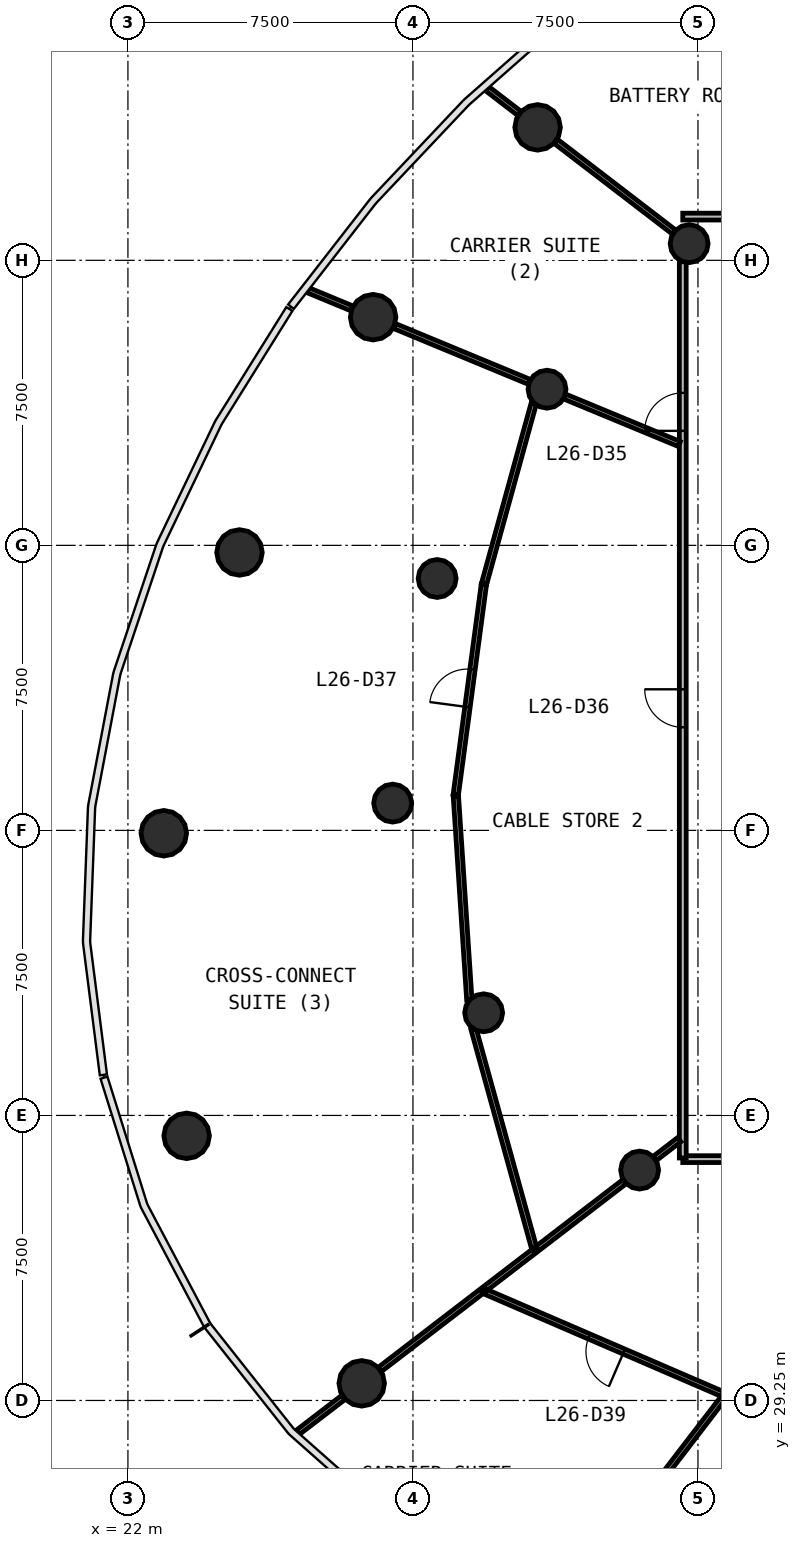
"""IFC4 building model, lengths in metres.
Left out: names, types, materials, properties, quantities, classifications, styles, units other than length and angle.
Written with IfcOpenShell. Run it as: python <this file> out.ifc"""

import sys

from ifc_helpers import new_model, si_unit, direction, frame, frame_2d, origin, origin_2d, place, context, subcontext, project, spatial, rectangle, circle, extrude, source, transform, mapped, element, fill, save


model = new_model("IFC4")
c1 = context("Model", 3, precision=1e-05, world=origin(), true_north=direction((0.0, 1.0)))
c2 = subcontext(c1, "Body", "Model", "MODEL_VIEW")
j1 = project(units=[si_unit("LENGTHUNIT", "METRE"), si_unit("PLANEANGLEUNIT", "RADIAN")], contexts=[c1])
p1 = place(None, origin())
s1 = spatial("IfcSite", under=j1, at=p1, CompositionType="ELEMENT")
p2 = place(p1, origin())
s2 = spatial("IfcBuilding", under=s1, at=p2, CompositionType="ELEMENT")
p3 = place(p2, frame((0.0, 0.0, 112.6)))
s3 = spatial("IfcBuildingStorey", under=s2, at=p3, CompositionType="ELEMENT", Elevation=112.6)
m1 = source(origin(), c2, "Body", "SweptSolid", [
    extrude(circle(Radius=0.6, at=origin_2d()), origin(), (0.0, 0.0, 1.0), 4.1),
])
for number, where, z_axis, x_axis in (
    (1, (32.78, 62.748, 0.0), (0.0, 0.0, 1.0), (1.0, 0.0, 0.0)),
    (2, (28.452, 57.754, 0.0), (0.0, 0.0, 1.0), (1.0, 0.0, 0.0)),
    (3, (24.936, 51.563, 0.0), (0.0, 0.0, 1.0), (1.0, 0.0, 0.0)),
    (4, (22.944, 44.175, 0.0), (0.0, 0.0, 1.0), (1.0, 0.0, 0.0)),
    (5, (23.544, 36.213, 0.0), (0.0, 0.0, 1.0), (1.0, 0.0, 0.0)),
    (6, (28.152, 29.701, 0.0), (0.0, 0.0, 1.0), (1.0, 0.0, 0.0)),
):
    element("IfcColumn", number, at=place(p3, frame(where, z_axis=z_axis, x_axis=x_axis)), inside=s3, PredefinedType="COLUMN", context=c2, shape_type="MappedRepresentation", body=[
        mapped(m1, transform((0.0, 0.0, 0.0), scale=1.0)),
    ])
m2 = source(origin(), c2, "Body", "SweptSolid", [
    extrude(circle(Radius=0.5, at=origin_2d()), origin(), (0.0, 0.0, 1.0), 4.1),
])
for number, where, z_axis, x_axis in (
    (7, (36.768, 59.688, 0.0), (0.0, 0.0, 1.0), (1.0, 0.0, 0.0)),
    (8, (33.028, 55.859, 0.0), (0.0, 0.0, 1.0), (1.0, 0.0, 0.0)),
    (9, (30.137, 50.878, 0.0), (0.0, 0.0, 1.0), (1.0, 0.0, 0.0)),
    (10, (28.966, 44.968, 0.0), (0.0, 0.0, 1.0), (1.0, 0.0, 0.0)),
    (11, (31.361, 39.451, 0.0), (0.0, 0.0, 1.0), (1.0, 0.0, 0.0)),
    (12, (35.465, 35.312, 0.0), (0.0, 0.0, 1.0), (1.0, 0.0, 0.0)),
):
    element("IfcColumn", number, at=place(p3, frame(where, z_axis=z_axis, x_axis=x_axis)), inside=s3, PredefinedType="COLUMN", context=c2, shape_type="MappedRepresentation", body=[
        mapped(m2, transform((0.0, 0.0, 0.0), scale=1.0)),
    ])
p4 = place(p3, frame((67.4, 35.6, 0.0), z_axis=(0.0, 0.0, 1.0), x_axis=(-1.0, 0.0, 0.0)))
e13 = element("IfcWall", 13, at=p4, inside=s3, PredefinedType="PARTITIONING", context=c2, shape_type="SweptSolid", body=[
    extrude(rectangle(XDim=30.8, YDim=0.18, at=frame_2d((15.4, 0.0))), origin(), (0.0, 0.0, 1.0), 2.9),
])
p5 = place(p4, frame((17.35, 0.0, 0.0)))
e14 = element("IfcOpeningElement", 14, at=p5, cuts=e13, PredefinedType="OPENING", context=c2, shape_type="SweptSolid", body=[
    extrude(rectangle(XDim=1.0, YDim=2.1, at=frame_2d((0.5, 1.05))), frame((0.0, 0.1, 0.0), z_axis=(0.0, -1.0, 0.0), x_axis=(1.0, 0.0, 0.0)), (0.0, 0.0, 1.0), 0.2),
])
p6 = place(p4, frame((14.95, 0.0, 0.0)))
e15 = element("IfcOpeningElement", 15, at=p6, cuts=e13, PredefinedType="OPENING", context=c2, shape_type="SweptSolid", body=[
    extrude(rectangle(XDim=1.0, YDim=2.1, at=frame_2d((0.5, 1.05))), frame((0.0, 0.1, 0.0), z_axis=(0.0, -1.0, 0.0), x_axis=(1.0, 0.0, 0.0)), (0.0, 0.0, 1.0), 0.2),
])
p7 = place(p4, frame((8.95, 0.0, 0.0)))
e16 = element("IfcOpeningElement", 16, at=p7, cuts=e13, PredefinedType="OPENING", context=c2, shape_type="SweptSolid", body=[
    extrude(rectangle(XDim=1.0, YDim=2.1, at=frame_2d((0.5, 1.05))), frame((0.0, 0.1, 0.0), z_axis=(0.0, -1.0, 0.0), x_axis=(1.0, 0.0, 0.0)), (0.0, 0.0, 1.0), 0.2),
])
p8 = place(p3, frame((36.6, 60.4, 0.0), z_axis=(0.0, 0.0, 1.0), x_axis=(1.0, 0.0, 0.0)))
e17 = element("IfcWall", 17, at=p8, inside=s3, PredefinedType="PARTITIONING", context=c2, shape_type="SweptSolid", body=[
    extrude(rectangle(XDim=30.8, YDim=0.18, at=frame_2d((15.4, 0.0))), origin(), (0.0, 0.0, 1.0), 2.9),
])
p9 = place(p8, frame((14.95, 0.0, 0.0)))
e18 = element("IfcOpeningElement", 18, at=p9, cuts=e17, PredefinedType="OPENING", context=c2, shape_type="SweptSolid", body=[
    extrude(rectangle(XDim=1.0, YDim=2.1, at=frame_2d((0.5, 1.05))), frame((0.0, 0.1, 0.0), z_axis=(0.0, -1.0, 0.0), x_axis=(1.0, 0.0, 0.0)), (0.0, 0.0, 1.0), 0.2),
])
p10 = place(p8, frame((12.55, 0.0, 0.0)))
e19 = element("IfcOpeningElement", 19, at=p10, cuts=e17, PredefinedType="OPENING", context=c2, shape_type="SweptSolid", body=[
    extrude(rectangle(XDim=1.0, YDim=2.1, at=frame_2d((0.5, 1.05))), frame((0.0, 0.1, 0.0), z_axis=(0.0, -1.0, 0.0), x_axis=(1.0, 0.0, 0.0)), (0.0, 0.0, 1.0), 0.2),
])
p11 = place(p8, frame((4.35, 0.0, 0.0)))
e20 = element("IfcOpeningElement", 20, at=p11, cuts=e17, PredefinedType="OPENING", context=c2, shape_type="SweptSolid", body=[
    extrude(rectangle(XDim=1.0, YDim=2.1, at=frame_2d((0.5, 1.05))), frame((0.0, 0.1, 0.0), z_axis=(0.0, -1.0, 0.0), x_axis=(1.0, 0.0, 0.0)), (0.0, 0.0, 1.0), 0.2),
])
p12 = place(p3, frame((36.6, 35.63, 0.0), z_axis=(0.0, 0.0, 1.0), x_axis=(0.0, 1.0, 0.0)))
e21 = element("IfcWall", 21, at=p12, inside=s3, PredefinedType="PARTITIONING", context=c2, shape_type="SweptSolid", body=[
    extrude(rectangle(XDim=23.583, YDim=0.18, at=frame_2d((11.791, 0.0))), origin(), (0.0, 0.0, 1.0), 2.9),
])
p13 = place(p12, frame((19.133, 0.0, 0.0)))
e22 = element("IfcOpeningElement", 22, at=p13, cuts=e21, PredefinedType="OPENING", context=c2, shape_type="SweptSolid", body=[
    extrude(rectangle(XDim=1.0, YDim=2.1, at=frame_2d((0.5, 1.05))), frame((0.0, 0.1, 0.0), z_axis=(0.0, -1.0, 0.0), x_axis=(1.0, 0.0, 0.0)), (0.0, 0.0, 1.0), 0.2),
])
p14 = place(p12, frame((11.333, 0.0, 0.0)))
e23 = element("IfcOpeningElement", 23, at=p14, cuts=e21, PredefinedType="OPENING", context=c2, shape_type="SweptSolid", body=[
    extrude(rectangle(XDim=1.0, YDim=2.1, at=frame_2d((0.5, 1.05))), frame((0.0, 0.1, 0.0), z_axis=(0.0, -1.0, 0.0), x_axis=(1.0, 0.0, 0.0)), (0.0, 0.0, 1.0), 0.2),
])
p15 = place(p3, frame((37.718, 29.387, 0.0), z_axis=(0.0, 0.0, 1.0), x_axis=(-0.918146849398, 0.396240284349, 0.0)))
e24 = element("IfcWall", 24, at=p15, inside=s3, PredefinedType="PARTITIONING", context=c2, shape_type="SweptSolid", body=[
    extrude(rectangle(XDim=6.953, YDim=0.14, at=frame_2d((3.477, 0.0))), origin(), (0.0, 0.0, 1.0), 2.9),
])
p16 = place(p15, frame((2.903, 0.0, 0.0)))
e25 = element("IfcOpeningElement", 25, at=p16, cuts=e24, PredefinedType="OPENING", context=c2, shape_type="SweptSolid", body=[
    extrude(rectangle(XDim=1.0, YDim=2.1, at=frame_2d((0.5, 1.05))), frame((0.0, 0.08, 0.0), z_axis=(0.0, -1.0, 0.0), x_axis=(1.0, 0.0, 0.0)), (0.0, 0.0, 1.0), 0.16),
])
p17 = place(p3, frame((31.095, 39.022, 0.0), z_axis=(0.0, 0.0, 1.0), x_axis=(0.266539759446, -0.963823924083, 0.0)))
e26 = element("IfcWall", 26, at=p17, inside=s3, PredefinedType="PARTITIONING", context=c2, shape_type="SweptSolid", body=[
    extrude(rectangle(XDim=6.045, YDim=0.14, at=frame_2d((3.023, 0.0))), origin(), (0.0, 0.0, 1.0), 2.9),
])
p18 = place(p3, frame((30.627, 45.186, 0.0), z_axis=(0.0, 0.0, 1.0), x_axis=(0.132367219545, 0.991200746161, 0.0)))
e27 = element("IfcWall", 27, at=p18, inside=s3, PredefinedType="PARTITIONING", context=c2, shape_type="SweptSolid", body=[
    extrude(rectangle(XDim=5.579, YDim=0.14, at=frame_2d((2.79, 0.0))), origin(), (0.0, 0.0, 1.0), 2.9),
])
p19 = place(p18, frame((2.33, 0.0, 0.0)))
e28 = element("IfcOpeningElement", 28, at=p19, cuts=e27, PredefinedType="OPENING", context=c2, shape_type="SweptSolid", body=[
    extrude(rectangle(XDim=1.0, YDim=2.1, at=frame_2d((0.5, 1.05))), frame((0.0, 0.08, 0.0), z_axis=(0.0, -1.0, 0.0), x_axis=(1.0, 0.0, 0.0)), (0.0, 0.0, 1.0), 0.16),
])
p20 = place(p3, frame((30.629, 45.156, 0.0), z_axis=(0.0, 0.0, 1.0), x_axis=(0.06605528981, -0.997815964338, 0.0)))
e29 = element("IfcWall", 29, at=p20, inside=s3, PredefinedType="PARTITIONING", context=c2, shape_type="SweptSolid", body=[
    extrude(rectangle(XDim=5.381, YDim=0.14, at=frame_2d((2.691, 0.0))), origin(), (0.0, 0.0, 1.0), 2.9),
])
p21 = place(p3, frame((32.681, 55.492, 0.0), z_axis=(0.0, 0.0, 1.0), x_axis=(-0.265604811496, -0.964081990346, 0.0)))
e30 = element("IfcWall", 30, at=p21, inside=s3, PredefinedType="PARTITIONING", context=c2, shape_type="SweptSolid", body=[
    extrude(rectangle(XDim=4.923, YDim=0.14, at=frame_2d((2.461, 0.0))), origin(), (0.0, 0.0, 1.0), 2.9),
])
p22 = place(p3, frame((37.674, 29.33, 0.0), z_axis=(0.0, 0.0, 1.0), x_axis=(-0.608749592837, -0.793362422365, 0.0)))
e31 = element("IfcWall", 31, at=p22, inside=s3, PredefinedType="PARTITIONING", context=c2, shape_type="SweptSolid", body=[
    extrude(rectangle(XDim=4.028, YDim=0.14, at=frame_2d((2.014, 0.0))), origin(), (0.0, 0.0, 1.0), 2.9),
])
p23 = place(p3, frame((36.367, 59.995, 0.0), z_axis=(0.0, 0.0, 1.0), x_axis=(-0.793362528146, 0.608749454977, 0.0)))
e32 = element("IfcWall", 32, at=p23, inside=s3, PredefinedType="PARTITIONING", context=c2, shape_type="SweptSolid", body=[
    extrude(rectangle(XDim=3.917, YDim=0.14, at=frame_2d((1.958, 0.0))), origin(), (0.0, 0.0, 1.0), 2.9),
])
p24 = place(p3, frame((32.561, 56.052, 0.0), z_axis=(0.0, 0.0, 1.0), x_axis=(-0.923885171168, 0.38266981916, 0.0)))
e33 = element("IfcWall", 33, at=p24, inside=s3, PredefinedType="PARTITIONING", context=c2, shape_type="SweptSolid", body=[
    extrude(rectangle(XDim=3.842, YDim=0.14, at=frame_2d((1.921, 0.0))), origin(), (0.0, 0.0, 1.0), 2.9),
])
p25 = place(p3, frame((31.311, 32.125, 0.0), z_axis=(0.0, 0.0, 1.0), x_axis=(-0.793367783223, -0.608742606152, 0.0)))
e34 = element("IfcWall", 34, at=p25, inside=s3, PredefinedType="PARTITIONING", context=c2, shape_type="SweptSolid", body=[
    extrude(rectangle(XDim=3.377, YDim=0.14, at=frame_2d((1.688, 0.0))), origin(), (0.0, 0.0, 1.0), 2.9),
])
p26 = place(p3, frame((36.51, 54.416, 0.0), z_axis=(0.0, 0.0, 1.0), x_axis=(-0.923911109142, 0.382607190737, 0.0)))
e35 = element("IfcWall", 35, at=p26, inside=s3, PredefinedType="PARTITIONING", context=c2, shape_type="SweptSolid", body=[
    extrude(rectangle(XDim=3.264, YDim=0.14, at=frame_2d((1.632, 0.0))), origin(), (0.0, 0.0, 1.0), 2.9),
])
p27 = place(p3, frame((35.065, 35.005, 0.0), z_axis=(0.0, 0.0, 1.0), x_axis=(-0.793337721891, -0.608781782764, 0.0)))
e36 = element("IfcWall", 36, at=p27, inside=s3, PredefinedType="PARTITIONING", context=c2, shape_type="SweptSolid", body=[
    extrude(rectangle(XDim=2.897, YDim=0.14, at=frame_2d((1.448, 0.0))), origin(), (0.0, 0.0, 1.0), 2.9),
])
p28 = place(p3, frame((32.683, 33.177, 0.0), z_axis=(0.0, 0.0, 1.0), x_axis=(-0.793368572463, -0.608741577542, 0.0)))
e37 = element("IfcWall", 37, at=p28, inside=s3, PredefinedType="PARTITIONING", context=c2, shape_type="SweptSolid", body=[
    extrude(rectangle(XDim=1.62, YDim=0.14, at=frame_2d((0.81, 0.0))), origin(), (0.0, 0.0, 1.0), 2.9),
])
p29 = place(p3, frame((27.672, 29.333, 0.0), z_axis=(0.0, 0.0, 1.0), x_axis=(-0.793320214774, -0.608804596592, 0.0)))
e38 = element("IfcWall", 38, at=p29, inside=s3, PredefinedType="PARTITIONING", context=c2, shape_type="SweptSolid", body=[
    extrude(rectangle(XDim=1.511, YDim=0.14, at=frame_2d((0.755, 0.0))), origin(), (0.0, 0.0, 1.0), 2.9),
])
p30 = place(p3, frame((27.893, 57.985, 0.0), z_axis=(0.0, 0.0, 1.0), x_axis=(-0.92389335771, 0.382650053678, 0.0)))
e39 = element("IfcWall", 39, at=p30, inside=s3, PredefinedType="PARTITIONING", context=c2, shape_type="SweptSolid", body=[
    extrude(rectangle(XDim=1.253, YDim=0.14, at=frame_2d((0.626, 0.0))), origin(), (0.0, 0.0, 1.0), 2.9),
])
p31 = place(p3, frame((32.301, 63.116, 0.0), z_axis=(0.0, 0.0, 1.0), x_axis=(-0.793283750572, 0.608852109365, 0.0)))
e40 = element("IfcWall", 40, at=p31, inside=s3, PredefinedType="PARTITIONING", context=c2, shape_type="SweptSolid", body=[
    extrude(rectangle(XDim=1.072, YDim=0.14, at=frame_2d((0.536, 0.0))), origin(), (0.0, 0.0, 1.0), 2.9),
])
p32 = place(p3, frame((36.51, 36.114, 0.0), z_axis=(0.0, 0.0, 1.0), x_axis=(-0.793316076519, -0.608809989025, 0.0)))
e41 = element("IfcWall", 41, at=p32, inside=s3, PredefinedType="PARTITIONING", context=c2, shape_type="SweptSolid", body=[
    extrude(rectangle(XDim=0.812, YDim=0.14, at=frame_2d((0.406, 0.0))), origin(), (0.0, 0.0, 1.0), 2.9),
])
m3 = source(origin(), c2, "Body", "SweptSolid", [
    extrude(rectangle(XDim=1.0, YDim=2.1, at=frame_2d((0.5, 1.05))), frame((0.0, 0.025, 0.0), z_axis=(0.0, -1.0, 0.0), x_axis=(1.0, 0.0, 0.0)), (0.0, 0.0, 1.0), 0.05),
])
p33 = place(p13, origin())
e42 = element("IfcDoor", 42, at=p33, inside=s3, OperationType="SINGLE_SWING_LEFT", PredefinedType="DOOR", context=c2, shape_type="MappedRepresentation", body=[
    mapped(m3, transform((0.0, 0.0, 0.0), scale=1.0)),
])
fill(e22, e42)
p34 = place(p14, origin())
e43 = element("IfcDoor", 43, at=p34, inside=s3, OperationType="SINGLE_SWING_RIGHT", PredefinedType="DOOR", context=c2, shape_type="MappedRepresentation", body=[
    mapped(m3, transform((0.0, 0.0, 0.0), scale=1.0)),
])
fill(e23, e43)
p35 = place(p19, origin())
e44 = element("IfcDoor", 44, at=p35, inside=s3, OperationType="SINGLE_SWING_LEFT", PredefinedType="DOOR", context=c2, shape_type="MappedRepresentation", body=[
    mapped(m3, transform((0.0, 0.0, 0.0), scale=1.0)),
])
fill(e28, e44)
p36 = place(p16, origin())
e45 = element("IfcDoor", 45, at=p36, inside=s3, OperationType="SINGLE_SWING_LEFT", PredefinedType="DOOR", context=c2, shape_type="MappedRepresentation", body=[
    mapped(m3, transform((0.0, 0.0, 0.0), scale=1.0)),
])
fill(e25, e45)
save(model, sys.argv[1])
